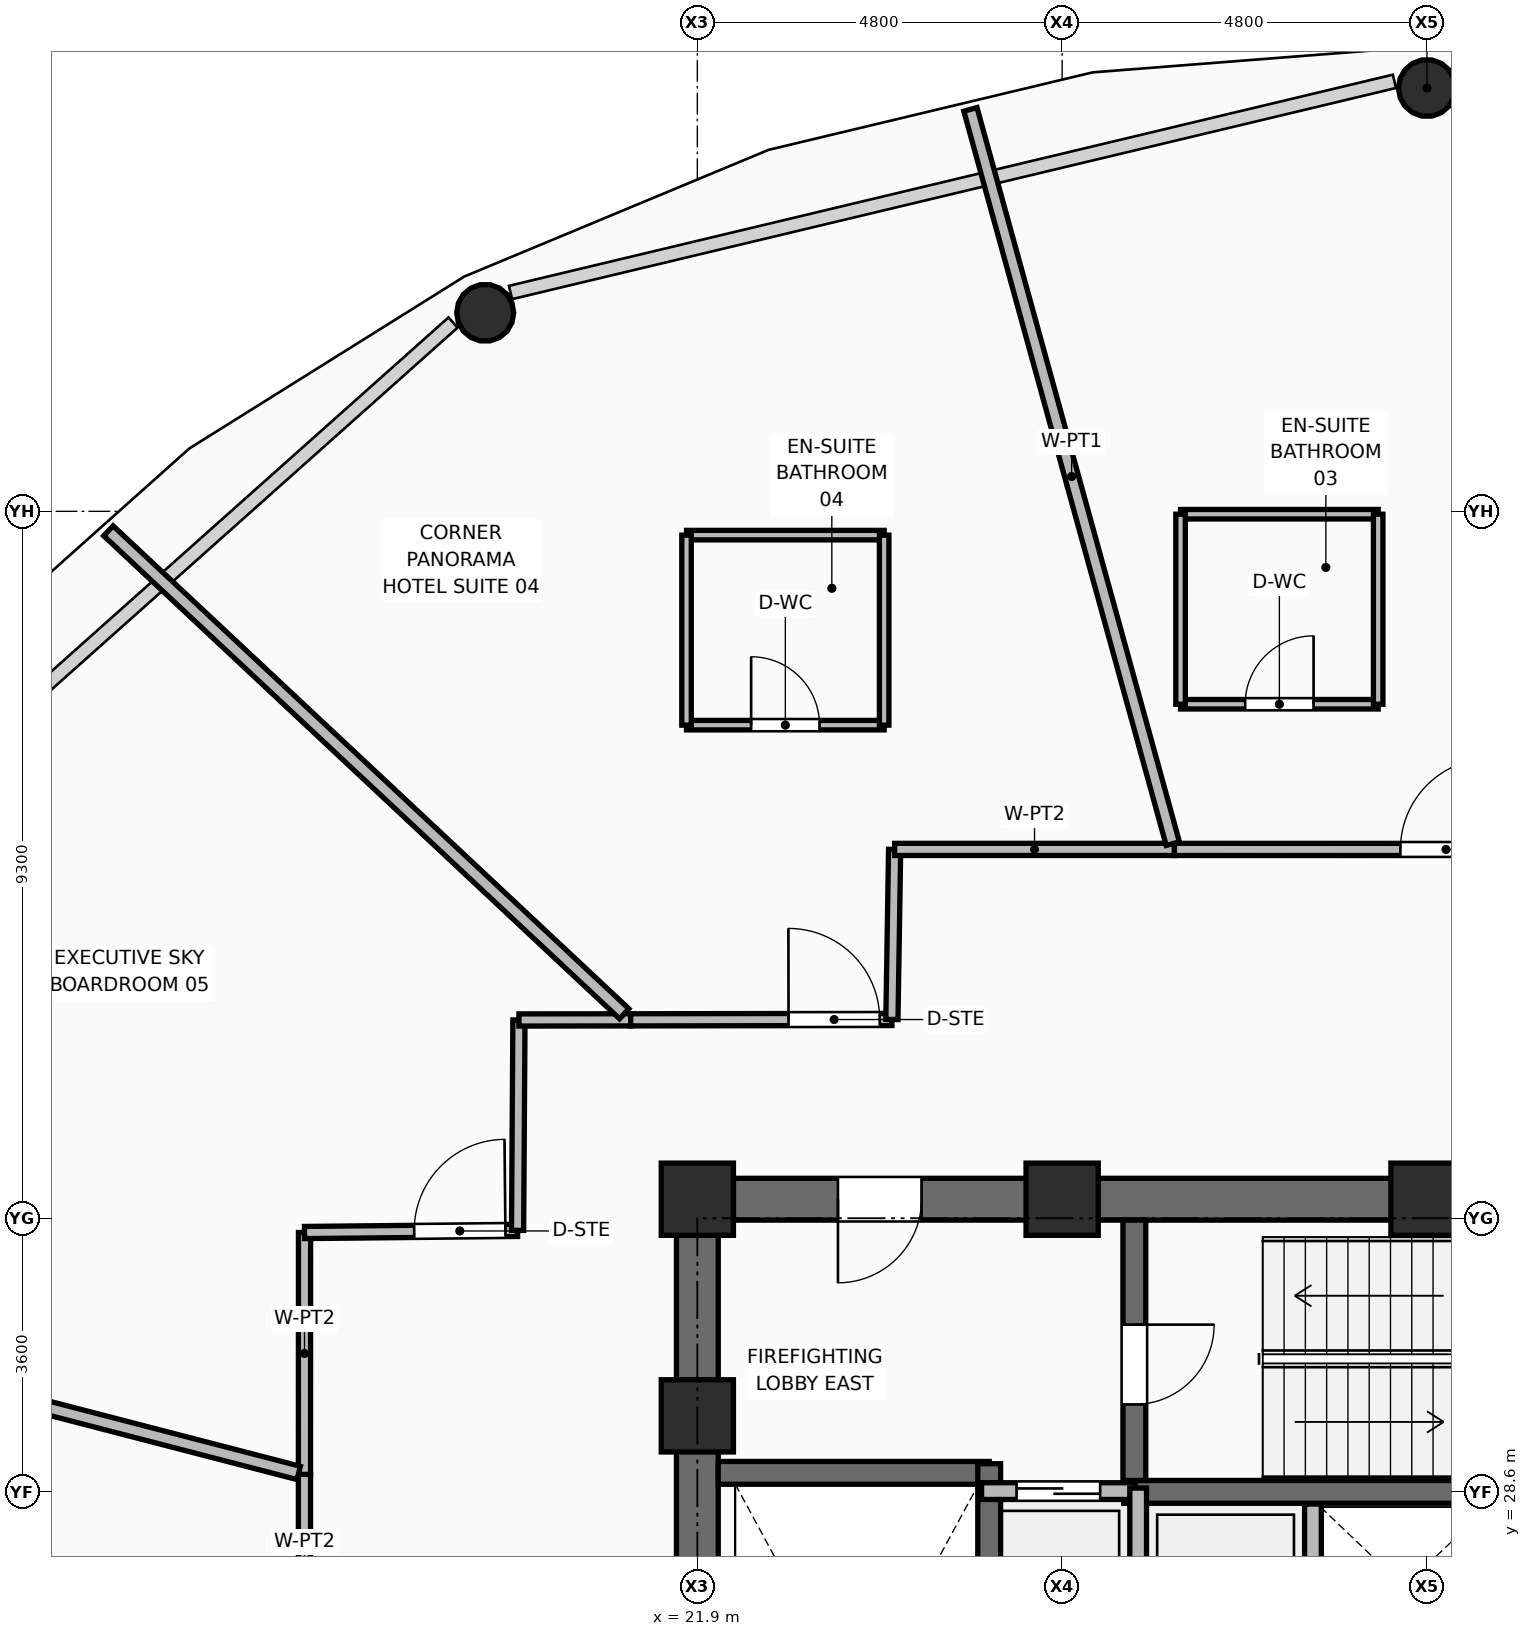
"""IFC4 building model, lengths in metres.
Left out: names, types, materials, properties, quantities, classifications, styles, units other than length and angle.
Written with IfcOpenShell. Run it as: python <this file> out.ifc"""

import sys

from ifc_helpers import new_model, si_unit, direction, frame, frame_2d, origin, origin_2d, place, context, subcontext, project, spatial, rectangle, hollow_circle, extrude, element, fill, save


model = new_model("IFC4")
c1 = context("Model", 3, precision=1e-05, world=origin(), true_north=direction((0.0, 1.0)))
c2 = subcontext(c1, "Body", "Model", "MODEL_VIEW")
j1 = project(units=[si_unit("LENGTHUNIT", "METRE"), si_unit("PLANEANGLEUNIT", "RADIAN")], contexts=[c1])
p1 = place(None, origin())
s1 = spatial("IfcSite", under=j1, at=p1, CompositionType="ELEMENT")
p2 = place(p1, origin())
s2 = spatial("IfcBuilding", under=s1, at=p2, CompositionType="ELEMENT")
p3 = place(p2, frame((0.0, 0.0, 160.95)))
s3 = spatial("IfcBuildingStorey", under=s2, at=p3, CompositionType="ELEMENT", Elevation=160.95)
for number, where, z_axis, x_axis in (
    (1, (21.9, 29.6, 0.0), (0.0, 0.0, 1.0), (1.0, 0.0, 0.0)),
    (2, (21.9, 32.45, 0.0), (0.0, 0.0, 1.0), (1.0, 0.0, 0.0)),
    (3, (26.7, 32.45, 0.0), (0.0, 0.0, 1.0), (1.0, 0.0, 0.0)),
    (4, (31.5, 32.45, 0.0), (0.0, 0.0, 1.0), (1.0, 0.0, 0.0)),
):
    element("IfcColumn", number, at=place(p3, frame(where, z_axis=z_axis, x_axis=x_axis)), inside=s3, PredefinedType="COLUMN", context=c2, shape_type="SweptSolid", body=[
        extrude(rectangle(XDim=0.95, YDim=0.95, at=origin_2d()), origin(), (0.0, 0.0, 1.0), 3.75),
    ])
p4 = place(p3, frame((31.5, 47.069, 0.0), z_axis=(0.0, -0.061838614669, 0.998086161479), x_axis=(1.0, 0.0, 0.0)))
e5 = element("IfcColumn", 5, at=p4, inside=s3, PredefinedType="COLUMN", context=c2, shape_type="SweptSolid", body=[
    extrude(hollow_circle(Radius=0.375, WallThickness=0.035, at=origin_2d()), origin(), (0.0, 0.0, 1.0), 3.577),
])
p5 = place(p3, frame((19.109, 44.112, 0.0), z_axis=(0.034396582019, -0.053437547065, 0.997978608843), x_axis=(0.840864304793, 0.541245989292, 0.0)))
e6 = element("IfcColumn", 6, at=p5, inside=s3, PredefinedType="COLUMN", context=c2, shape_type="SweptSolid", body=[
    extrude(hollow_circle(Radius=0.375, WallThickness=0.035, at=origin_2d()), origin(), (0.0, 0.0, 1.0), 3.577),
])
p6 = place(p3, frame((30.0, 25.71, 0.0), z_axis=(0.0, 0.0, 1.0), x_axis=(0.0, 1.0, 0.0)))
e7 = element("IfcWall", 7, at=p6, inside=s3, PredefinedType="PARTITIONING", context=c2, shape_type="SweptSolid", body=[
    extrude(rectangle(XDim=2.73, YDim=0.22, at=frame_2d((1.365, 0.0))), origin(), (0.0, 0.0, 1.0), 3.545),
])
p7 = place(p3, frame((21.625, 32.45, 0.0), z_axis=(0.0, 0.0, 1.0), x_axis=(1.0, 0.0, 0.0)))
e8 = element("IfcWall", 8, at=p7, inside=s3, PredefinedType="SHEAR", context=c2, shape_type="SweptSolid", body=[
    extrude(rectangle(XDim=19.75, YDim=0.55, at=frame_2d((9.875, 0.0))), origin(), (0.0, 0.0, 1.0), 3.57),
])
p8 = place(p7, frame((2.125, 0.0, 0.0)))
e9 = element("IfcOpeningElement", 9, at=p8, cuts=e8, PredefinedType="OPENING", context=c2, shape_type="SweptSolid", body=[
    extrude(rectangle(XDim=1.1, YDim=2.1, at=frame_2d((0.55, 1.05))), frame((0.0, 0.285, 0.0), z_axis=(0.0, -1.0, 0.0), x_axis=(1.0, 0.0, 0.0)), (0.0, 0.0, 1.0), 0.57),
])
p9 = place(p7, frame((15.515, 0.0, 0.0)))
e10 = element("IfcOpeningElement", 10, at=p9, cuts=e8, PredefinedType="OPENING", context=c2, shape_type="SweptSolid", body=[
    extrude(rectangle(XDim=1.0, YDim=2.1, at=frame_2d((0.5, 1.05))), frame((0.0, 0.285, 0.0), z_axis=(0.0, -1.0, 0.0), x_axis=(1.0, 0.0, 0.0)), (0.0, 0.0, 1.0), 0.57),
])
p10 = place(p7, frame((17.525, 0.0, 0.0)))
e11 = element("IfcOpeningElement", 11, at=p10, cuts=e8, PredefinedType="OPENING", context=c2, shape_type="SweptSolid", body=[
    extrude(rectangle(XDim=0.9, YDim=2.1, at=frame_2d((0.45, 1.05))), frame((0.0, 0.285, 0.0), z_axis=(0.0, -1.0, 0.0), x_axis=(1.0, 0.0, 0.0)), (0.0, 0.0, 1.0), 0.57),
])
p11 = place(p3, frame((21.9, 18.075, 0.0), z_axis=(0.0, 0.0, 1.0), x_axis=(0.0, 1.0, 0.0)))
e12 = element("IfcWall", 12, at=p11, inside=s3, PredefinedType="SHEAR", context=c2, shape_type="SweptSolid", body=[
    extrude(rectangle(XDim=14.1, YDim=0.55, at=frame_2d((7.05, 0.0))), origin(), (0.0, 0.0, 1.0), 3.57),
])
p12 = place(p3, frame((22.175, 28.85, 0.0), z_axis=(0.0, 0.0, 1.0), x_axis=(1.0, 0.0, 0.0)))
e13 = element("IfcWall", 13, at=p12, inside=s3, PredefinedType="SHEAR", context=c2, shape_type="SweptSolid", body=[
    extrude(rectangle(XDim=3.565, YDim=0.3, at=frame_2d((1.782, 0.0))), origin(), (0.0, 0.0, 1.0), 3.57),
])
p13 = place(p3, frame((25.74, 20.98, 0.0), z_axis=(0.0, 0.0, 1.0), x_axis=(0.0, 1.0, 0.0)))
e14 = element("IfcWall", 14, at=p13, inside=s3, PredefinedType="SHEAR", context=c2, shape_type="SweptSolid", body=[
    extrude(rectangle(XDim=7.99, YDim=0.3, at=frame_2d((3.995, 0.0))), origin(), (0.0, 0.0, 1.0), 3.57),
])
p14 = place(p3, frame((27.51, 28.6, 0.0), z_axis=(0.0, 0.0, 1.0), x_axis=(1.0, 0.0, 0.0)))
e15 = element("IfcWall", 15, at=p14, inside=s3, PredefinedType="SHEAR", context=c2, shape_type="SweptSolid", body=[
    extrude(rectangle(XDim=8.03, YDim=0.3, at=frame_2d((4.015, 0.0))), origin(), (0.0, 0.0, 1.0), 3.57),
])
p15 = place(p3, frame((27.65, 28.75, 0.0), z_axis=(0.0, 0.0, 1.0), x_axis=(0.0, 1.0, 0.0)))
e16 = element("IfcWall", 16, at=p15, inside=s3, PredefinedType="SHEAR", context=c2, shape_type="SweptSolid", body=[
    extrude(rectangle(XDim=3.425, YDim=0.3, at=frame_2d((1.712, 0.0))), origin(), (0.0, 0.0, 1.0), 3.57),
])
p16 = place(p15, frame((1.0, 0.0, 0.0)))
e17 = element("IfcOpeningElement", 17, at=p16, cuts=e16, PredefinedType="OPENING", context=c2, shape_type="SweptSolid", body=[
    extrude(rectangle(XDim=1.05, YDim=2.1, at=frame_2d((0.525, 1.05))), frame((0.0, 0.16, 0.0), z_axis=(0.0, -1.0, 0.0), x_axis=(1.0, 0.0, 0.0)), (0.0, 0.0, 1.0), 0.32),
])
p17 = place(p3, frame((25.64, 28.61, 0.0), z_axis=(0.0, 0.0, 1.0), x_axis=(1.0, 0.0, 0.0)))
e18 = element("IfcWall", 18, at=p17, inside=s3, PredefinedType="PARTITIONING", context=c2, shape_type="SweptSolid", body=[
    extrude(rectangle(XDim=2.02, YDim=0.22, at=frame_2d((1.01, 0.0))), origin(), (0.0, 0.0, 1.0), 3.55),
])
p18 = place(p17, frame((0.46, 0.0, 0.0)))
e19 = element("IfcOpeningElement", 19, at=p18, cuts=e18, PredefinedType="OPENING", context=c2, shape_type="SweptSolid", body=[
    extrude(rectangle(XDim=1.1, YDim=2.2, at=frame_2d((0.55, 1.1))), frame((0.0, 0.12, 0.0), z_axis=(0.0, -1.0, 0.0), x_axis=(1.0, 0.0, 0.0)), (0.0, 0.0, 1.0), 0.24),
])
p19 = place(p3, frame((27.7, 25.65, 0.0), z_axis=(0.0, 0.0, 1.0), x_axis=(0.0, 1.0, 0.0)))
e20 = element("IfcWall", 20, at=p19, inside=s3, PredefinedType="PARTITIONING", context=c2, shape_type="SweptSolid", body=[
    extrude(rectangle(XDim=3.0, YDim=0.22, at=frame_2d((1.5, 0.0))), origin(), (0.0, 0.0, 1.0), 3.55),
])
p20 = place(p3, frame((16.731, 26.142, 0.0), z_axis=(0.0, 0.0, 1.0), x_axis=(0.0, 1.0, 0.0)))
e21 = element("IfcWall", 21, at=p20, inside=s3, PredefinedType="PARTITIONING", context=c2, shape_type="SweptSolid", body=[
    extrude(rectangle(XDim=2.688, YDim=0.16, at=frame_2d((1.344, 0.0))), origin(), (0.0, 0.0, 1.0), 3.55),
])
p21 = place(p3, frame((16.731, 28.83, 0.0), z_axis=(0.0, 0.0, 1.0), x_axis=(0.000306913206, 0.999999952902, 0.0)))
e22 = element("IfcWall", 22, at=p21, inside=s3, PredefinedType="PARTITIONING", context=c2, shape_type="SweptSolid", body=[
    extrude(rectangle(XDim=3.182, YDim=0.16, at=frame_2d((1.591, 0.0))), origin(), (0.0, 0.0, 1.0), 3.55),
])
p22 = place(p3, frame((16.732, 32.012, 0.0), z_axis=(0.0, 0.0, 1.0), x_axis=(0.999949838147, 0.010016046632, 0.0)))
e23 = element("IfcWall", 23, at=p22, inside=s3, PredefinedType="PARTITIONING", context=c2, shape_type="SweptSolid", body=[
    extrude(rectangle(XDim=2.803, YDim=0.16, at=frame_2d((1.402, 0.0))), origin(), (0.0, 0.0, 1.0), 3.55),
])
p23 = place(p22, frame((1.443, 0.0, 0.0)))
e24 = element("IfcOpeningElement", 24, at=p23, cuts=e23, PredefinedType="OPENING", context=c2, shape_type="SweptSolid", body=[
    extrude(rectangle(XDim=1.2, YDim=2.1, at=frame_2d((0.6, 1.05))), frame((0.0, 0.09, 0.0), z_axis=(0.0, -1.0, 0.0), x_axis=(1.0, 0.0, 0.0)), (0.0, 0.0, 1.0), 0.18),
])
p24 = place(p3, frame((19.535, 32.04, 0.0), z_axis=(0.0, 0.0, 1.0), x_axis=(0.006526585281, 0.999978701615, 0.0)))
e25 = element("IfcWall", 25, at=p24, inside=s3, PredefinedType="PARTITIONING", context=c2, shape_type="SweptSolid", body=[
    extrude(rectangle(XDim=2.768, YDim=0.16, at=frame_2d((1.384, 0.0))), origin(), (0.0, 0.0, 1.0), 3.006),
])
p25 = place(p3, frame((19.553, 34.808, 0.0), z_axis=(0.0, 0.0, 1.0), x_axis=(0.999999117302, 0.00132868177, 0.0)))
e26 = element("IfcWall", 26, at=p25, inside=s3, PredefinedType="PARTITIONING", context=c2, shape_type="SweptSolid", body=[
    extrude(rectangle(XDim=1.47, YDim=0.16, at=frame_2d((0.735, 0.0))), origin(), (0.0, 0.0, 1.0), 3.55),
])
p26 = place(p3, frame((21.023, 34.81, 0.0), z_axis=(0.0, 0.0, 1.0), x_axis=(0.999998990869, 0.00142065491, 0.0)))
e27 = element("IfcWall", 27, at=p26, inside=s3, PredefinedType="PARTITIONING", context=c2, shape_type="SweptSolid", body=[
    extrude(rectangle(XDim=3.437, YDim=0.16, at=frame_2d((1.719, 0.0))), origin(), (0.0, 0.0, 1.0), 3.006),
])
p27 = place(p26, frame((2.077, 0.0, 0.0)))
e28 = element("IfcOpeningElement", 28, at=p27, cuts=e27, PredefinedType="OPENING", context=c2, shape_type="SweptSolid", body=[
    extrude(rectangle(XDim=1.2, YDim=2.1, at=frame_2d((0.6, 1.05))), frame((0.0, 0.09, 0.0), z_axis=(0.0, -1.0, 0.0), x_axis=(1.0, 0.0, 0.0)), (0.0, 0.0, 1.0), 0.18),
])
p28 = place(p3, frame((24.46, 34.815, 0.0), z_axis=(0.0, 0.0, 1.0), x_axis=(0.016149808833, 0.999869583333, 0.0)))
e29 = element("IfcWall", 29, at=p28, inside=s3, PredefinedType="PARTITIONING", context=c2, shape_type="SweptSolid", body=[
    extrude(rectangle(XDim=2.237, YDim=0.16, at=frame_2d((1.119, 0.0))), origin(), (0.0, 0.0, 1.0), 3.55),
])
p29 = place(p3, frame((24.496, 37.052, 0.0), z_axis=(0.0, 0.0, 1.0), x_axis=(1.0, 0.0, 0.0)))
e30 = element("IfcWall", 30, at=p29, inside=s3, PredefinedType="PARTITIONING", context=c2, shape_type="SweptSolid", body=[
    extrude(rectangle(XDim=3.681, YDim=0.16, at=frame_2d((1.84, 0.0))), origin(), (0.0, 0.0, 1.0), 3.55),
])
p30 = place(p3, frame((28.177, 37.052, 0.0), z_axis=(0.0, 0.0, 1.0), x_axis=(0.99999999066, -0.000136677372, 0.0)))
e31 = element("IfcWall", 31, at=p30, inside=s3, PredefinedType="PARTITIONING", context=c2, shape_type="SweptSolid", body=[
    extrude(rectangle(XDim=7.145, YDim=0.16, at=frame_2d((3.573, 0.0))), origin(), (0.0, 0.0, 1.0), 3.006),
])
p31 = place(p30, frame((2.973, 0.0, 0.0)))
e32 = element("IfcOpeningElement", 32, at=p31, cuts=e31, PredefinedType="OPENING", context=c2, shape_type="SweptSolid", body=[
    extrude(rectangle(XDim=1.2, YDim=2.1, at=frame_2d((0.6, 1.05))), frame((0.0, 0.09, 0.0), z_axis=(0.0, -1.0, 0.0), x_axis=(1.0, 0.0, 0.0)), (0.0, 0.0, 1.0), 0.18),
])
p32 = place(p3, frame((28.156, 37.128, 0.0), z_axis=(0.0, 0.0, 1.0), x_axis=(-0.265763479933, 0.964038263107, 0.0)))
e33 = element("IfcWall", 33, at=p32, inside=s3, PredefinedType="PARTITIONING", context=c2, shape_type="SweptSolid", body=[
    extrude(rectangle(XDim=10.021, YDim=0.18, at=frame_2d((5.01, 0.0))), origin(), (0.0, 0.0, 1.0), 2.852),
])
p33 = place(p3, frame((20.938, 34.89, 0.0), z_axis=(0.0, 0.0, 1.0), x_axis=(-0.730006343417, 0.683440369433, 0.0)))
e34 = element("IfcWall", 34, at=p33, inside=s3, PredefinedType="PARTITIONING", context=c2, shape_type="SweptSolid", body=[
    extrude(rectangle(XDim=9.296, YDim=0.18, at=frame_2d((4.648, 0.0))), origin(), (0.0, 0.0, 1.0), 2.852),
])
p34 = place(p3, frame((16.655, 28.849, 0.0), z_axis=(0.0, 0.0, 1.0), x_axis=(-0.967996440842, 0.250963922742, 0.0)))
e35 = element("IfcWall", 35, at=p34, inside=s3, PredefinedType="PARTITIONING", context=c2, shape_type="SweptSolid", body=[
    extrude(rectangle(XDim=9.606, YDim=0.18, at=frame_2d((4.803, 0.0))), origin(), (0.0, 0.0, 1.0), 2.852),
])
p35 = place(p3, frame((28.258, 38.962, 0.0), z_axis=(0.0, 0.0, 1.0), x_axis=(1.0, 0.0, 0.0)))
e36 = element("IfcWall", 36, at=p35, inside=s3, PredefinedType="PARTITIONING", context=c2, shape_type="SweptSolid", body=[
    extrude(rectangle(XDim=2.6, YDim=0.125, at=frame_2d((1.3, 0.0))), origin(), (0.0, 0.0, 1.0), 3.55),
])
p36 = place(p35, frame((0.85, 0.0, 0.0)))
e37 = element("IfcOpeningElement", 37, at=p36, cuts=e36, PredefinedType="OPENING", context=c2, shape_type="SweptSolid", body=[
    extrude(rectangle(XDim=0.9, YDim=2.1, at=frame_2d((0.45, 1.05))), frame((0.0, 0.073, 0.0), z_axis=(0.0, -1.0, 0.0), x_axis=(1.0, 0.0, 0.0)), (0.0, 0.0, 1.0), 0.145),
])
p37 = place(p3, frame((28.258, 41.462, 0.0), z_axis=(0.0, 0.0, 1.0), x_axis=(1.0, 0.0, 0.0)))
e38 = element("IfcWall", 38, at=p37, inside=s3, PredefinedType="PARTITIONING", context=c2, shape_type="SweptSolid", body=[
    extrude(rectangle(XDim=2.6, YDim=0.125, at=frame_2d((1.3, 0.0))), origin(), (0.0, 0.0, 1.0), 3.55),
])
for number, where, z_axis, x_axis in (
    (39, (28.258, 38.962, 0.0), (0.0, 0.0, 1.0), (0.0, 1.0, 0.0)),
    (40, (30.858, 38.962, 0.0), (0.0, 0.0, 1.0), (0.0, 1.0, 0.0)),
):
    element("IfcWall", number, at=place(p3, frame(where, z_axis=z_axis, x_axis=x_axis)), inside=s3, PredefinedType="PARTITIONING", context=c2, shape_type="SweptSolid", body=[
        extrude(rectangle(XDim=2.5, YDim=0.125, at=frame_2d((1.25, 0.0))), origin(), (0.0, 0.0, 1.0), 3.55),
    ])
p38 = place(p3, frame((21.758, 38.687, 0.0), z_axis=(0.0, 0.0, 1.0), x_axis=(1.0, 0.0, 0.0)))
e41 = element("IfcWall", 41, at=p38, inside=s3, PredefinedType="PARTITIONING", context=c2, shape_type="SweptSolid", body=[
    extrude(rectangle(XDim=2.6, YDim=0.125, at=frame_2d((1.3, 0.0))), origin(), (0.0, 0.0, 1.0), 3.55),
])
p39 = place(p38, frame((0.85, 0.0, 0.0)))
e42 = element("IfcOpeningElement", 42, at=p39, cuts=e41, PredefinedType="OPENING", context=c2, shape_type="SweptSolid", body=[
    extrude(rectangle(XDim=0.9, YDim=2.1, at=frame_2d((0.45, 1.05))), frame((0.0, 0.073, 0.0), z_axis=(0.0, -1.0, 0.0), x_axis=(1.0, 0.0, 0.0)), (0.0, 0.0, 1.0), 0.145),
])
p40 = place(p3, frame((21.758, 41.187, 0.0), z_axis=(0.0, 0.0, 1.0), x_axis=(1.0, 0.0, 0.0)))
e43 = element("IfcWall", 43, at=p40, inside=s3, PredefinedType="PARTITIONING", context=c2, shape_type="SweptSolid", body=[
    extrude(rectangle(XDim=2.6, YDim=0.125, at=frame_2d((1.3, 0.0))), origin(), (0.0, 0.0, 1.0), 3.55),
])
for number, where, z_axis, x_axis in (
    (44, (21.758, 38.687, 0.0), (0.0, 0.0, 1.0), (0.0, 1.0, 0.0)),
    (45, (24.358, 38.687, 0.0), (0.0, 0.0, 1.0), (0.0, 1.0, 0.0)),
):
    element("IfcWall", number, at=place(p3, frame(where, z_axis=z_axis, x_axis=x_axis)), inside=s3, PredefinedType="PARTITIONING", context=c2, shape_type="SweptSolid", body=[
        extrude(rectangle(XDim=2.5, YDim=0.125, at=frame_2d((1.25, 0.0))), origin(), (0.0, 0.0, 1.0), 3.55),
    ])
p41 = place(p16, frame((1.05, 0.0, 0.0), z_axis=(0.0, 0.0, 1.0), x_axis=(-1.0, 0.0, 0.0)))
e46 = element("IfcDoor", 46, at=p41, inside=s3, OperationType="SINGLE_SWING_LEFT", PredefinedType="DOOR", context=c2, shape_type="SweptSolid", body=[
    extrude(rectangle(XDim=1.05, YDim=2.1, at=frame_2d((0.525, 1.05))), frame((0.0, 0.025, 0.0), z_axis=(0.0, -1.0, 0.0), x_axis=(1.0, 0.0, 0.0)), (0.0, 0.0, 1.0), 0.05),
])
fill(e17, e46)
p42 = place(p18, origin())
e47 = element("IfcDoor", 47, at=p42, inside=s3, OperationType="DOUBLE_DOOR_SLIDING", PredefinedType="DOOR", context=c2, shape_type="SweptSolid", body=[
    extrude(rectangle(XDim=1.1, YDim=2.2, at=frame_2d((0.55, 1.1))), frame((0.0, 0.025, 0.0), z_axis=(0.0, -1.0, 0.0), x_axis=(1.0, 0.0, 0.0)), (0.0, 0.0, 1.0), 0.05),
])
fill(e19, e47)
p43 = place(p8, frame((1.1, 0.0, 0.0), z_axis=(0.0, 0.0, 1.0), x_axis=(-1.0, 0.0, 0.0)))
e48 = element("IfcDoor", 48, at=p43, inside=s3, OperationType="SINGLE_SWING_RIGHT", PredefinedType="DOOR", context=c2, shape_type="SweptSolid", body=[
    extrude(rectangle(XDim=1.1, YDim=2.1, at=frame_2d((0.55, 1.05))), frame((0.0, 0.025, 0.0), z_axis=(0.0, -1.0, 0.0), x_axis=(1.0, 0.0, 0.0)), (0.0, 0.0, 1.0), 0.05),
])
fill(e9, e48)
p44 = place(p36, origin())
e49 = element("IfcDoor", 49, at=p44, inside=s3, OperationType="SINGLE_SWING_RIGHT", PredefinedType="DOOR", context=c2, shape_type="SweptSolid", body=[
    extrude(rectangle(XDim=0.9, YDim=2.1, at=frame_2d((0.45, 1.05))), frame((0.0, 0.025, 0.0), z_axis=(0.0, -1.0, 0.0), x_axis=(1.0, 0.0, 0.0)), (0.0, 0.0, 1.0), 0.05),
])
fill(e37, e49)
p45 = place(p31, origin())
e50 = element("IfcDoor", 50, at=p45, inside=s3, OperationType="SINGLE_SWING_RIGHT", PredefinedType="DOOR", context=c2, shape_type="SweptSolid", body=[
    extrude(rectangle(XDim=1.2, YDim=2.1, at=frame_2d((0.6, 1.05))), frame((0.0, 0.025, 0.0), z_axis=(0.0, -1.0, 0.0), x_axis=(1.0, 0.0, 0.0)), (0.0, 0.0, 1.0), 0.05),
])
fill(e32, e50)
p46 = place(p39, origin())
e51 = element("IfcDoor", 51, at=p46, inside=s3, OperationType="SINGLE_SWING_LEFT", PredefinedType="DOOR", context=c2, shape_type="SweptSolid", body=[
    extrude(rectangle(XDim=0.9, YDim=2.1, at=frame_2d((0.45, 1.05))), frame((0.0, 0.025, 0.0), z_axis=(0.0, -1.0, 0.0), x_axis=(1.0, 0.0, 0.0)), (0.0, 0.0, 1.0), 0.05),
])
fill(e42, e51)
p47 = place(p27, origin())
e52 = element("IfcDoor", 52, at=p47, inside=s3, OperationType="SINGLE_SWING_LEFT", PredefinedType="DOOR", context=c2, shape_type="SweptSolid", body=[
    extrude(rectangle(XDim=1.2, YDim=2.1, at=frame_2d((0.6, 1.05))), frame((0.0, 0.025, 0.0), z_axis=(0.0, -1.0, 0.0), x_axis=(1.0, 0.0, 0.0)), (0.0, 0.0, 1.0), 0.05),
])
fill(e28, e52)
p48 = place(p23, origin())
e53 = element("IfcDoor", 53, at=p48, inside=s3, OperationType="SINGLE_SWING_RIGHT", PredefinedType="DOOR", context=c2, shape_type="SweptSolid", body=[
    extrude(rectangle(XDim=1.2, YDim=2.1, at=frame_2d((0.6, 1.05))), frame((0.0, 0.025, 0.0), z_axis=(0.0, -1.0, 0.0), x_axis=(1.0, 0.0, 0.0)), (0.0, 0.0, 1.0), 0.05),
])
fill(e24, e53)
save(model, sys.argv[1])
